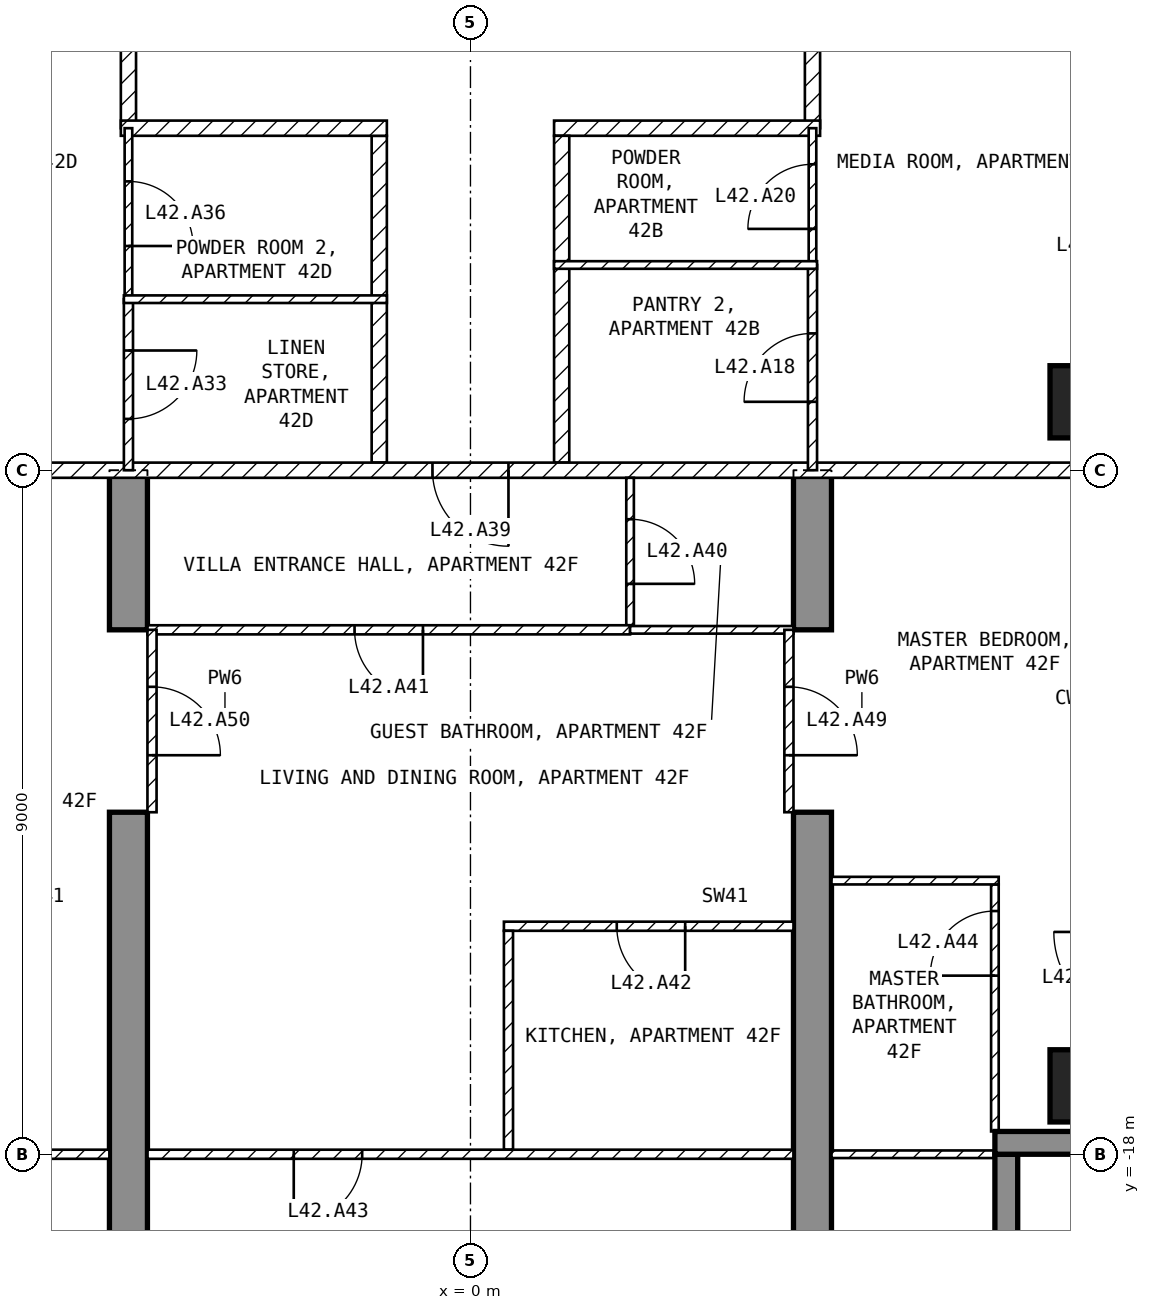
"""IFC4 building model, lengths in metres.
Left out: names, types, materials, properties, quantities, classifications, styles, units other than length and angle.
Written with IfcOpenShell. Run it as: python <this file> out.ifc"""

import sys

from ifc_helpers import new_model, si_unit, direction, frame, frame_2d, origin, origin_2d, place, context, subcontext, project, spatial, polyline, rectangle, outline, extrude, element, fill, save


model = new_model("IFC4")
c1 = context("Model", 3, precision=1e-05, world=origin(), true_north=direction((0.0, 1.0)))
c2 = subcontext(c1, "Body", "Model", "MODEL_VIEW")
j1 = project(units=[si_unit("LENGTHUNIT", "METRE"), si_unit("PLANEANGLEUNIT", "RADIAN")], contexts=[c1])
p1 = place(None, origin())
s1 = spatial("IfcSite", under=j1, at=p1, CompositionType="ELEMENT")
p2 = place(p1, origin())
s2 = spatial("IfcBuilding", under=s1, at=p2, CompositionType="ELEMENT")
p3 = place(p2, frame((0.0, 0.0, 173.6)))
s3 = spatial("IfcBuildingStorey", under=s2, at=p3, CompositionType="ELEMENT", Elevation=173.6)
for number, where, z_axis, x_axis in (
    (1, (8.1, -17.1, -0.25), (0.0, 0.0, 1.0), (1.0, 0.0, 0.0)),
    (2, (8.1, -8.1, -0.25), (0.0, 0.0, 1.0), (1.0, 0.0, 0.0)),
):
    element("IfcColumn", number, at=place(p3, frame(where, z_axis=z_axis, x_axis=x_axis)), inside=s3, PredefinedType="COLUMN", context=c2, shape_type="SweptSolid", body=[
        extrude(rectangle(XDim=0.95, YDim=0.95, at=origin_2d()), origin(), (0.0, 0.0, 1.0), 3.5),
    ])
for number, where, z_axis, x_axis in (
    (3, (-4.75, -20.225, -0.25), (1.0, 0.0, 0.0), (0.0, 1.0, 0.0)),
    (4, (4.25, -20.225, -0.25), (1.0, 0.0, 0.0), (0.0, 1.0, 0.0)),
):
    element("IfcWall", number, at=place(p3, frame(where, z_axis=z_axis, x_axis=x_axis)), inside=s3, PredefinedType="SHEAR", context=c2, shape_type="SweptSolid", body=[
        extrude(outline(polyline([(0.0, 0.0), (6.725, 0.0), (6.725, 2.65), (9.125, 2.65), (9.125, 0.0), (11.225, 0.0), (11.225, 3.5), (0.0, 3.5), (0.0, 0.0)])), origin(), (0.0, 0.0, 1.0), 0.5),
    ])
p4 = place(p3, frame((7.05, -19.8, 0.0), z_axis=(0.0, 0.0, 1.0), x_axis=(0.0, 1.0, 0.0)))
e5 = element("IfcWall", 5, at=p4, inside=s3, PredefinedType="SOLIDWALL", context=c2, shape_type="SweptSolid", body=[
    extrude(rectangle(XDim=1.8, YDim=0.3, at=frame_2d((0.9, 0.0))), origin(), (0.0, 0.0, 1.0), 3.25),
])
p5 = place(p3, frame((6.9, -17.85, 0.0), z_axis=(0.0, 0.0, 1.0), x_axis=(1.0, 0.0, 0.0)))
e6 = element("IfcWall", 6, at=p5, inside=s3, PredefinedType="SOLIDWALL", context=c2, shape_type="SweptSolid", body=[
    extrude(rectangle(XDim=1.85, YDim=0.3, at=frame_2d((0.925, 0.0))), origin(), (0.0, 0.0, 1.0), 3.25),
])
p6 = place(p3, frame((4.5, -1.3, 0.0), z_axis=(0.0, 0.0, 1.0), x_axis=(0.0, -1.0, 0.0)))
e7 = element("IfcWall", 7, at=p6, inside=s3, PredefinedType="PARTITIONING", context=c2, shape_type="SweptSolid", body=[
    extrude(rectangle(XDim=3.2, YDim=0.2, at=frame_2d((1.6, 0.0))), origin(), (0.0, 0.0, 1.0), 3.25),
])
p7 = place(p3, frame((4.6, -4.5, 0.0), z_axis=(0.0, 0.0, 1.0), x_axis=(-1.0, 0.0, 0.0)))
e8 = element("IfcWall", 8, at=p7, inside=s3, PredefinedType="PARTITIONING", context=c2, shape_type="SweptSolid", body=[
    extrude(rectangle(XDim=3.5, YDim=0.2, at=frame_2d((1.75, 0.0))), origin(), (0.0, 0.0, 1.0), 3.25),
])
p8 = place(p3, frame((1.2, -4.6, 0.0), z_axis=(0.0, 0.0, 1.0), x_axis=(0.0, -1.0, 0.0)))
e9 = element("IfcWall", 9, at=p8, inside=s3, PredefinedType="PARTITIONING", context=c2, shape_type="SweptSolid", body=[
    extrude(rectangle(XDim=4.3, YDim=0.2, at=frame_2d((2.15, 0.0))), origin(), (0.0, 0.0, 1.0), 3.25),
])
p9 = place(p3, frame((-4.5, -4.5, 0.0), z_axis=(0.0, 0.0, 1.0), x_axis=(0.0, 1.0, 0.0)))
e10 = element("IfcWall", 10, at=p9, inside=s3, PredefinedType="PARTITIONING", context=c2, shape_type="SweptSolid", body=[
    extrude(rectangle(XDim=3.2, YDim=0.2, at=frame_2d((1.6, 0.0))), origin(), (0.0, 0.0, 1.0), 3.25),
])
p10 = place(p3, frame((-1.2, -8.9, 0.0), z_axis=(0.0, 0.0, 1.0), x_axis=(0.0, 1.0, 0.0)))
e11 = element("IfcWall", 11, at=p10, inside=s3, PredefinedType="PARTITIONING", context=c2, shape_type="SweptSolid", body=[
    extrude(rectangle(XDim=4.3, YDim=0.2, at=frame_2d((2.15, 0.0))), origin(), (0.0, 0.0, 1.0), 3.25),
])
p11 = place(p3, frame((-1.1, -4.5, 0.0), z_axis=(0.0, 0.0, 1.0), x_axis=(-1.0, 0.0, 0.0)))
e12 = element("IfcWall", 12, at=p11, inside=s3, PredefinedType="PARTITIONING", context=c2, shape_type="SweptSolid", body=[
    extrude(rectangle(XDim=3.5, YDim=0.2, at=frame_2d((1.75, 0.0))), origin(), (0.0, 0.0, 1.0), 3.25),
])
p12 = place(p3, frame((8.92, -9.0, 0.0), z_axis=(0.0, 0.0, 1.0), x_axis=(-1.0, 0.0, 0.0)))
e13 = element("IfcWall", 13, at=p12, inside=s3, PredefinedType="PARTITIONING", context=c2, shape_type="SweptSolid", body=[
    extrude(rectangle(XDim=17.84, YDim=0.2, at=frame_2d((8.92, 0.0))), origin(), (0.0, 0.0, 1.0), 3.25),
])
p13 = place(p12, frame((8.42, 0.0, 0.0)))
e14 = element("IfcOpeningElement", 14, at=p13, cuts=e13, PredefinedType="OPENING", context=c2, shape_type="SweptSolid", body=[
    extrude(rectangle(XDim=1.0, YDim=2.1, at=frame_2d((0.5, 1.05))), frame((0.0, 0.11, 0.0), z_axis=(0.0, -1.0, 0.0), x_axis=(1.0, 0.0, 0.0)), (0.0, 0.0, 1.0), 0.22),
])
p14 = place(p3, frame((4.5, -6.3, 0.0), z_axis=(0.0, 0.0, 1.0), x_axis=(0.0, 1.0, 0.0)))
e15 = element("IfcWall", 15, at=p14, inside=s3, PredefinedType="PARTITIONING", context=c2, shape_type="SweptSolid", body=[
    extrude(rectangle(XDim=1.8, YDim=0.1, at=frame_2d((0.9, 0.0))), origin(), (0.0, 0.0, 1.0), 3.25),
])
p15 = place(p14, frame((0.475, 0.0, 0.0)))
e16 = element("IfcOpeningElement", 16, at=p15, cuts=e15, PredefinedType="OPENING", context=c2, shape_type="SweptSolid", body=[
    extrude(rectangle(XDim=0.85, YDim=2.1, at=frame_2d((0.425, 1.05))), frame((0.0, 0.06, 0.0), z_axis=(0.0, -1.0, 0.0), x_axis=(1.0, 0.0, 0.0)), (0.0, 0.0, 1.0), 0.12),
])
p16 = place(p3, frame((4.5, -9.0, 0.0), z_axis=(0.0, 0.0, 1.0), x_axis=(0.0, 1.0, 0.0)))
e17 = element("IfcWall", 17, at=p16, inside=s3, PredefinedType="PARTITIONING", context=c2, shape_type="SweptSolid", body=[
    extrude(rectangle(XDim=2.7, YDim=0.12, at=frame_2d((1.35, 0.0))), origin(), (0.0, 0.0, 1.0), 3.25),
])
p17 = place(p16, frame((0.9, 0.0, 0.0)))
e18 = element("IfcOpeningElement", 18, at=p17, cuts=e17, PredefinedType="OPENING", context=c2, shape_type="SweptSolid", body=[
    extrude(rectangle(XDim=0.9, YDim=2.1, at=frame_2d((0.45, 1.05))), frame((0.0, 0.07, 0.0), z_axis=(0.0, -1.0, 0.0), x_axis=(1.0, 0.0, 0.0)), (0.0, 0.0, 1.0), 0.14),
])
p18 = place(p3, frame((4.56, -6.3, 0.0), z_axis=(0.0, 0.0, 1.0), x_axis=(-1.0, 0.0, 0.0)))
e19 = element("IfcWall", 19, at=p18, inside=s3, PredefinedType="PARTITIONING", context=c2, shape_type="SweptSolid", body=[
    extrude(rectangle(XDim=3.46, YDim=0.1, at=frame_2d((1.73, 0.0))), origin(), (0.0, 0.0, 1.0), 3.25),
])
p19 = place(p3, frame((-4.5, -4.5, 0.0), z_axis=(0.0, 0.0, 1.0), x_axis=(0.0, -1.0, 0.0)))
e20 = element("IfcWall", 20, at=p19, inside=s3, PredefinedType="PARTITIONING", context=c2, shape_type="SweptSolid", body=[
    extrude(rectangle(XDim=2.25, YDim=0.1, at=frame_2d((1.125, 0.0))), origin(), (0.0, 0.0, 1.0), 3.25),
])
p20 = place(p19, frame((0.7, 0.0, 0.0)))
e21 = element("IfcOpeningElement", 21, at=p20, cuts=e20, PredefinedType="OPENING", context=c2, shape_type="SweptSolid", body=[
    extrude(rectangle(XDim=0.85, YDim=2.1, at=frame_2d((0.425, 1.05))), frame((0.0, 0.06, 0.0), z_axis=(0.0, -1.0, 0.0), x_axis=(1.0, 0.0, 0.0)), (0.0, 0.0, 1.0), 0.12),
])
p21 = place(p3, frame((-4.5, -6.75, 0.0), z_axis=(0.0, 0.0, 1.0), x_axis=(0.0, -1.0, 0.0)))
e22 = element("IfcWall", 22, at=p21, inside=s3, PredefinedType="PARTITIONING", context=c2, shape_type="SweptSolid", body=[
    extrude(rectangle(XDim=2.25, YDim=0.12, at=frame_2d((1.125, 0.0))), origin(), (0.0, 0.0, 1.0), 3.25),
])
p22 = place(p21, frame((0.675, 0.0, 0.0)))
e23 = element("IfcOpeningElement", 23, at=p22, cuts=e22, PredefinedType="OPENING", context=c2, shape_type="SweptSolid", body=[
    extrude(rectangle(XDim=0.9, YDim=2.1, at=frame_2d((0.45, 1.05))), frame((0.0, 0.07, 0.0), z_axis=(0.0, -1.0, 0.0), x_axis=(1.0, 0.0, 0.0)), (0.0, 0.0, 1.0), 0.14),
])
p23 = place(p3, frame((-1.1, -6.75, 0.0), z_axis=(0.0, 0.0, 1.0), x_axis=(-1.0, 0.0, 0.0)))
e24 = element("IfcWall", 24, at=p23, inside=s3, PredefinedType="PARTITIONING", context=c2, shape_type="SweptSolid", body=[
    extrude(rectangle(XDim=3.46, YDim=0.1, at=frame_2d((1.73, 0.0))), origin(), (0.0, 0.0, 1.0), 3.25),
])
p24 = place(p3, frame((2.1, -9.1, 0.0), z_axis=(0.0, 0.0, 1.0), x_axis=(0.0, -1.0, 0.0)))
e25 = element("IfcWall", 25, at=p24, inside=s3, PredefinedType="PARTITIONING", context=c2, shape_type="SweptSolid", body=[
    extrude(rectangle(XDim=1.94, YDim=0.1, at=frame_2d((0.97, 0.0))), origin(), (0.0, 0.0, 1.0), 3.25),
])
p25 = place(p24, frame((0.545, 0.0, 0.0)))
e26 = element("IfcOpeningElement", 26, at=p25, cuts=e25, PredefinedType="OPENING", context=c2, shape_type="SweptSolid", body=[
    extrude(rectangle(XDim=0.85, YDim=2.1, at=frame_2d((0.425, 1.05))), frame((0.0, 0.06, 0.0), z_axis=(0.0, -1.0, 0.0), x_axis=(1.0, 0.0, 0.0)), (0.0, 0.0, 1.0), 0.12),
])
p26 = place(p3, frame((2.1, -11.1, 0.0), z_axis=(0.0, 0.0, 1.0), x_axis=(-1.0, 0.0, 0.0)))
e27 = element("IfcWall", 27, at=p26, inside=s3, PredefinedType="PARTITIONING", context=c2, shape_type="SweptSolid", body=[
    extrude(rectangle(XDim=6.35, YDim=0.12, at=frame_2d((3.175, 0.0))), origin(), (0.0, 0.0, 1.0), 3.25),
])
p27 = place(p26, frame((2.725, 0.0, 0.0)))
e28 = element("IfcOpeningElement", 28, at=p27, cuts=e27, PredefinedType="OPENING", context=c2, shape_type="SweptSolid", body=[
    extrude(rectangle(XDim=0.9, YDim=2.1, at=frame_2d((0.45, 1.05))), frame((0.0, 0.07, 0.0), z_axis=(0.0, -1.0, 0.0), x_axis=(1.0, 0.0, 0.0)), (0.0, 0.0, 1.0), 0.14),
])
p28 = place(p3, frame((4.25, -11.1, 0.0), z_axis=(0.0, 0.0, 1.0), x_axis=(-1.0, 0.0, 0.0)))
e29 = element("IfcWall", 29, at=p28, inside=s3, PredefinedType="PARTITIONING", context=c2, shape_type="SweptSolid", body=[
    extrude(rectangle(XDim=2.15, YDim=0.1, at=frame_2d((1.075, 0.0))), origin(), (0.0, 0.0, 1.0), 3.25),
])
p29 = place(p3, frame((4.25, -15.0, 0.0), z_axis=(0.0, 0.0, 1.0), x_axis=(-1.0, 0.0, 0.0)))
e30 = element("IfcWall", 30, at=p29, inside=s3, PredefinedType="PARTITIONING", context=c2, shape_type="SweptSolid", body=[
    extrude(rectangle(XDim=3.81, YDim=0.12, at=frame_2d((1.905, 0.0))), origin(), (0.0, 0.0, 1.0), 3.25),
])
p30 = place(p29, frame((1.425, 0.0, 0.0)))
e31 = element("IfcOpeningElement", 31, at=p30, cuts=e30, PredefinedType="OPENING", context=c2, shape_type="SweptSolid", body=[
    extrude(rectangle(XDim=0.9, YDim=2.1, at=frame_2d((0.45, 1.05))), frame((0.0, 0.07, 0.0), z_axis=(0.0, -1.0, 0.0), x_axis=(1.0, 0.0, 0.0)), (0.0, 0.0, 1.0), 0.14),
])
p31 = place(p3, frame((0.5, -15.06, 0.0), z_axis=(0.0, 0.0, 1.0), x_axis=(0.0, -1.0, 0.0)))
e32 = element("IfcWall", 32, at=p31, inside=s3, PredefinedType="PARTITIONING", context=c2, shape_type="SweptSolid", body=[
    extrude(rectangle(XDim=2.88, YDim=0.12, at=frame_2d((1.44, 0.0))), origin(), (0.0, 0.0, 1.0), 3.25),
])
p32 = place(p3, frame((4.25, -18.0, 0.0), z_axis=(0.0, 0.0, 1.0), x_axis=(-1.0, 0.0, 0.0)))
e33 = element("IfcWall", 33, at=p32, inside=s3, PredefinedType="PARTITIONING", context=c2, shape_type="SweptSolid", body=[
    extrude(rectangle(XDim=8.5, YDim=0.12, at=frame_2d((4.25, 0.0))), origin(), (0.0, 0.0, 1.0), 3.25),
])
p33 = place(p32, frame((5.675, 0.0, 0.0)))
e34 = element("IfcOpeningElement", 34, at=p33, cuts=e33, PredefinedType="OPENING", context=c2, shape_type="SweptSolid", body=[
    extrude(rectangle(XDim=0.9, YDim=2.1, at=frame_2d((0.45, 1.05))), frame((0.0, 0.07, 0.0), z_axis=(0.0, -1.0, 0.0), x_axis=(1.0, 0.0, 0.0)), (0.0, 0.0, 1.0), 0.14),
])
p34 = place(p3, frame((6.9, -17.7, 0.0), z_axis=(0.0, 0.0, 1.0), x_axis=(0.0, 1.0, 0.0)))
e35 = element("IfcWall", 35, at=p34, inside=s3, PredefinedType="PARTITIONING", context=c2, shape_type="SweptSolid", body=[
    extrude(rectangle(XDim=3.25, YDim=0.1, at=frame_2d((1.625, 0.0))), origin(), (0.0, 0.0, 1.0), 3.25),
])
p35 = place(p34, frame((2.05, 0.0, 0.0)))
e36 = element("IfcOpeningElement", 36, at=p35, cuts=e35, PredefinedType="OPENING", context=c2, shape_type="SweptSolid", body=[
    extrude(rectangle(XDim=0.85, YDim=2.1, at=frame_2d((0.425, 1.05))), frame((0.0, 0.06, 0.0), z_axis=(0.0, -1.0, 0.0), x_axis=(1.0, 0.0, 0.0)), (0.0, 0.0, 1.0), 0.12),
])
p36 = place(p3, frame((6.95, -14.4, 0.0), z_axis=(0.0, 0.0, 1.0), x_axis=(-1.0, 0.0, 0.0)))
e37 = element("IfcWall", 37, at=p36, inside=s3, PredefinedType="PARTITIONING", context=c2, shape_type="SweptSolid", body=[
    extrude(rectangle(XDim=2.2, YDim=0.1, at=frame_2d((1.1, 0.0))), origin(), (0.0, 0.0, 1.0), 3.25),
])
p37 = place(p3, frame((7.12, -18.0, 0.0), z_axis=(0.0, 0.0, 1.0), x_axis=(-1.0, 0.0, 0.0)))
e38 = element("IfcWall", 38, at=p37, inside=s3, PredefinedType="PARTITIONING", context=c2, shape_type="SweptSolid", body=[
    extrude(rectangle(XDim=2.37, YDim=0.1, at=frame_2d((1.185, 0.0))), origin(), (0.0, 0.0, 1.0), 3.25),
])
p38 = place(p3, frame((-4.75, -18.0, 0.0), z_axis=(0.0, 0.0, 1.0), x_axis=(-1.0, 0.0, 0.0)))
e39 = element("IfcWall", 39, at=p38, inside=s3, PredefinedType="PARTITIONING", context=c2, shape_type="SweptSolid", body=[
    extrude(rectangle(XDim=2.37, YDim=0.12, at=frame_2d((1.185, 0.0))), origin(), (0.0, 0.0, 1.0), 3.25),
])
p39 = place(p3, frame((4.19, -11.1, 0.0), z_axis=(0.0, 0.0, 1.0), x_axis=(0.0, -1.0, 0.0)))
e40 = element("IfcWall", 40, at=p39, inside=s3, PredefinedType="PARTITIONING", context=c2, shape_type="SweptSolid", body=[
    extrude(rectangle(XDim=2.4, YDim=0.12, at=frame_2d((1.2, 0.0))), origin(), (0.0, 0.0, 1.0), 2.4),
])
p40 = place(p39, frame((0.75, 0.0, 0.0)))
e41 = element("IfcOpeningElement", 41, at=p40, cuts=e40, PredefinedType="OPENING", context=c2, shape_type="SweptSolid", body=[
    extrude(rectangle(XDim=0.9, YDim=2.1, at=frame_2d((0.45, 1.05))), frame((0.0, 0.07, 0.0), z_axis=(0.0, -1.0, 0.0), x_axis=(1.0, 0.0, 0.0)), (0.0, 0.0, 1.0), 0.14),
])
p41 = place(p3, frame((-4.19, -11.1, 0.0), z_axis=(0.0, 0.0, 1.0), x_axis=(0.0, -1.0, 0.0)))
e42 = element("IfcWall", 42, at=p41, inside=s3, PredefinedType="PARTITIONING", context=c2, shape_type="SweptSolid", body=[
    extrude(rectangle(XDim=2.4, YDim=0.12, at=frame_2d((1.2, 0.0))), origin(), (0.0, 0.0, 1.0), 2.4),
])
p42 = place(p41, frame((0.75, 0.0, 0.0)))
e43 = element("IfcOpeningElement", 43, at=p42, cuts=e42, PredefinedType="OPENING", context=c2, shape_type="SweptSolid", body=[
    extrude(rectangle(XDim=0.9, YDim=2.1, at=frame_2d((0.45, 1.05))), frame((0.0, 0.07, 0.0), z_axis=(0.0, -1.0, 0.0), x_axis=(1.0, 0.0, 0.0)), (0.0, 0.0, 1.0), 0.14),
])
p43 = place(p17, origin())
e44 = element("IfcDoor", 44, at=p43, inside=s3, OperationType="SINGLE_SWING_LEFT", PredefinedType="DOOR", context=c2, shape_type="SweptSolid", body=[
    extrude(rectangle(XDim=0.9, YDim=2.1, at=frame_2d((0.45, 1.05))), frame((0.0, 0.025, 0.0), z_axis=(0.0, -1.0, 0.0), x_axis=(1.0, 0.0, 0.0)), (0.0, 0.0, 1.0), 0.05),
])
fill(e18, e44)
p44 = place(p15, origin())
e45 = element("IfcDoor", 45, at=p44, inside=s3, OperationType="SINGLE_SWING_LEFT", PredefinedType="DOOR", context=c2, shape_type="SweptSolid", body=[
    extrude(rectangle(XDim=0.85, YDim=2.1, at=frame_2d((0.425, 1.05))), frame((0.0, 0.025, 0.0), z_axis=(0.0, -1.0, 0.0), x_axis=(1.0, 0.0, 0.0)), (0.0, 0.0, 1.0), 0.05),
])
fill(e16, e45)
p45 = place(p22, origin())
e46 = element("IfcDoor", 46, at=p45, inside=s3, OperationType="SINGLE_SWING_LEFT", PredefinedType="DOOR", context=c2, shape_type="SweptSolid", body=[
    extrude(rectangle(XDim=0.9, YDim=2.1, at=frame_2d((0.45, 1.05))), frame((0.0, 0.025, 0.0), z_axis=(0.0, -1.0, 0.0), x_axis=(1.0, 0.0, 0.0)), (0.0, 0.0, 1.0), 0.05),
])
fill(e23, e46)
p46 = place(p20, origin())
e47 = element("IfcDoor", 47, at=p46, inside=s3, OperationType="SINGLE_SWING_RIGHT", PredefinedType="DOOR", context=c2, shape_type="SweptSolid", body=[
    extrude(rectangle(XDim=0.85, YDim=2.1, at=frame_2d((0.425, 1.05))), frame((0.0, 0.025, 0.0), z_axis=(0.0, -1.0, 0.0), x_axis=(1.0, 0.0, 0.0)), (0.0, 0.0, 1.0), 0.05),
])
fill(e21, e47)
p47 = place(p13, origin())
e48 = element("IfcDoor", 48, at=p47, inside=s3, OperationType="SINGLE_SWING_LEFT", PredefinedType="DOOR", context=c2, shape_type="SweptSolid", body=[
    extrude(rectangle(XDim=1.0, YDim=2.1, at=frame_2d((0.5, 1.05))), frame((0.0, 0.025, 0.0), z_axis=(0.0, -1.0, 0.0), x_axis=(1.0, 0.0, 0.0)), (0.0, 0.0, 1.0), 0.05),
])
fill(e14, e48)
p48 = place(p25, origin())
e49 = element("IfcDoor", 49, at=p48, inside=s3, OperationType="SINGLE_SWING_RIGHT", PredefinedType="DOOR", context=c2, shape_type="SweptSolid", body=[
    extrude(rectangle(XDim=0.85, YDim=2.1, at=frame_2d((0.425, 1.05))), frame((0.0, 0.025, 0.0), z_axis=(0.0, -1.0, 0.0), x_axis=(1.0, 0.0, 0.0)), (0.0, 0.0, 1.0), 0.05),
])
fill(e26, e49)
p49 = place(p27, origin())
e50 = element("IfcDoor", 50, at=p49, inside=s3, OperationType="SINGLE_SWING_LEFT", PredefinedType="DOOR", context=c2, shape_type="SweptSolid", body=[
    extrude(rectangle(XDim=0.9, YDim=2.1, at=frame_2d((0.45, 1.05))), frame((0.0, 0.025, 0.0), z_axis=(0.0, -1.0, 0.0), x_axis=(1.0, 0.0, 0.0)), (0.0, 0.0, 1.0), 0.05),
])
fill(e28, e50)
p50 = place(p30, origin())
e51 = element("IfcDoor", 51, at=p50, inside=s3, OperationType="SINGLE_SWING_LEFT", PredefinedType="DOOR", context=c2, shape_type="SweptSolid", body=[
    extrude(rectangle(XDim=0.9, YDim=2.1, at=frame_2d((0.45, 1.05))), frame((0.0, 0.025, 0.0), z_axis=(0.0, -1.0, 0.0), x_axis=(1.0, 0.0, 0.0)), (0.0, 0.0, 1.0), 0.05),
])
fill(e31, e51)
p51 = place(p33, origin())
e52 = element("IfcDoor", 52, at=p51, inside=s3, OperationType="SINGLE_SWING_RIGHT", PredefinedType="DOOR", context=c2, shape_type="SweptSolid", body=[
    extrude(rectangle(XDim=0.9, YDim=2.1, at=frame_2d((0.45, 1.05))), frame((0.0, 0.025, 0.0), z_axis=(0.0, -1.0, 0.0), x_axis=(1.0, 0.0, 0.0)), (0.0, 0.0, 1.0), 0.05),
])
fill(e34, e52)
p52 = place(p35, origin())
e53 = element("IfcDoor", 53, at=p52, inside=s3, OperationType="SINGLE_SWING_LEFT", PredefinedType="DOOR", context=c2, shape_type="SweptSolid", body=[
    extrude(rectangle(XDim=0.85, YDim=2.1, at=frame_2d((0.425, 1.05))), frame((0.0, 0.025, 0.0), z_axis=(0.0, -1.0, 0.0), x_axis=(1.0, 0.0, 0.0)), (0.0, 0.0, 1.0), 0.05),
])
fill(e36, e53)
p53 = place(p40, origin())
e54 = element("IfcDoor", 54, at=p53, inside=s3, OperationType="SINGLE_SWING_RIGHT", PredefinedType="DOOR", context=c2, shape_type="SweptSolid", body=[
    extrude(rectangle(XDim=0.9, YDim=2.1, at=frame_2d((0.45, 1.05))), frame((0.0, 0.025, 0.0), z_axis=(0.0, -1.0, 0.0), x_axis=(1.0, 0.0, 0.0)), (0.0, 0.0, 1.0), 0.05),
])
fill(e41, e54)
p54 = place(p42, origin())
e55 = element("IfcDoor", 55, at=p54, inside=s3, OperationType="SINGLE_SWING_RIGHT", PredefinedType="DOOR", context=c2, shape_type="SweptSolid", body=[
    extrude(rectangle(XDim=0.9, YDim=2.1, at=frame_2d((0.45, 1.05))), frame((0.0, 0.025, 0.0), z_axis=(0.0, -1.0, 0.0), x_axis=(1.0, 0.0, 0.0)), (0.0, 0.0, 1.0), 0.05),
])
fill(e43, e55)
save(model, sys.argv[1])
